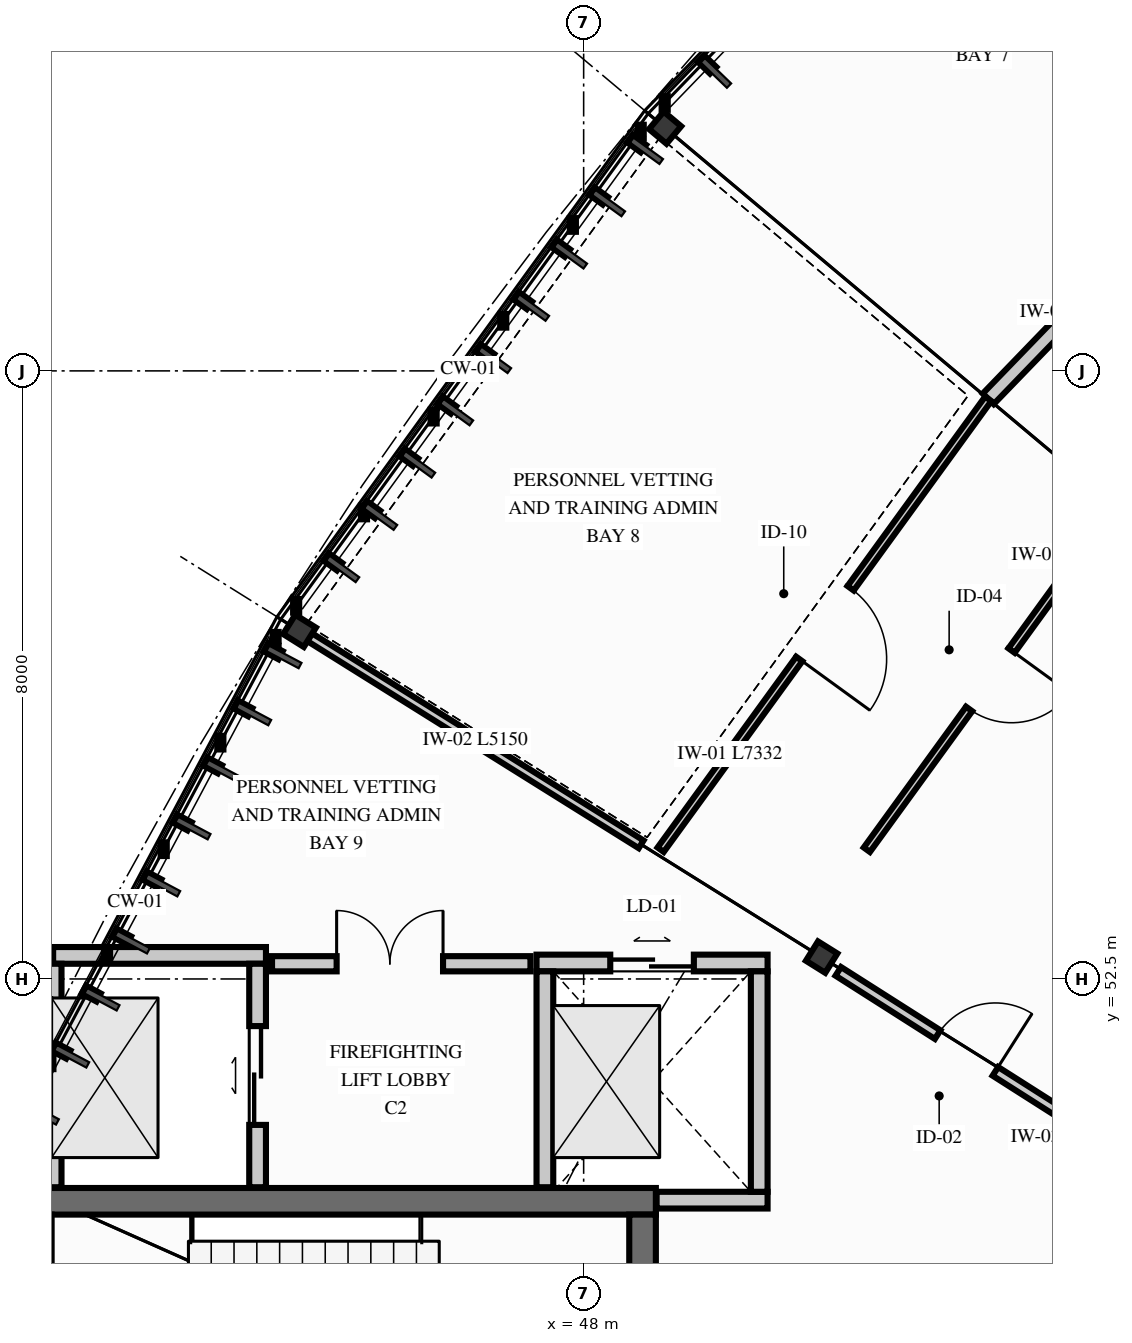
"""IFC4 building model, lengths in metres.
Left out: names, types, materials, properties, quantities, classifications, styles, units other than length and angle.
Written with IfcOpenShell. Run it as: python <this file> out.ifc"""

import sys

from ifc_helpers import new_model, si_unit, direction, frame, frame_2d, origin, origin_2d, place, context, subcontext, project, spatial, rectangle, i_section, extrude, element, fill, save


model = new_model("IFC4")
c1 = context("Model", 3, precision=1e-05, world=origin(), true_north=direction((0.0, 1.0)))
c2 = subcontext(c1, "Body", "Model", "MODEL_VIEW")
j1 = project(units=[si_unit("LENGTHUNIT", "METRE"), si_unit("PLANEANGLEUNIT", "RADIAN")], contexts=[c1])
p1 = place(None, origin())
s1 = spatial("IfcSite", under=j1, at=p1, CompositionType="ELEMENT")
p2 = place(p1, origin())
s2 = spatial("IfcBuilding", under=s1, at=p2, CompositionType="ELEMENT")
p3 = place(p2, frame((0.0, 0.0, 21.6)))
s3 = spatial("IfcBuildingStorey", under=s2, at=p3, CompositionType="ELEMENT", Elevation=21.6)
p4 = place(p3, frame((40.65, 49.575, 0.0), z_axis=(0.0, 0.0, 1.0), x_axis=(1.0, 0.0, 0.0)))
e1 = element("IfcWall", 1, at=p4, inside=s3, PredefinedType="SHEAR", context=c2, shape_type="SweptSolid", body=[
    extrude(rectangle(XDim=8.3, YDim=0.35, at=frame_2d((4.15, 0.0))), origin(), (0.0, 0.0, 1.0), 3.7),
])
p5 = place(p3, frame((48.775, 42.6, 0.0), z_axis=(0.0, 0.0, 1.0), x_axis=(0.0, 1.0, 0.0)))
e2 = element("IfcWall", 2, at=p5, inside=s3, PredefinedType="SHEAR", context=c2, shape_type="SweptSolid", body=[
    extrude(rectangle(XDim=6.8, YDim=0.35, at=frame_2d((3.4, 0.0))), origin(), (0.0, 0.0, 1.0), 3.7),
])
for number, where, z_axis, x_axis in (
    (3, (49.072, 63.699, 0.0), (0.0, 0.0, 1.0), (0.643, 0.766, 0.0)),
    (4, (51.131, 52.787, 0.0), (0.0, 0.0, 1.0), (0.53, 0.848, 0.0)),
):
    element("IfcColumn", number, at=place(p3, frame(where, z_axis=z_axis, x_axis=x_axis)), inside=s3, PredefinedType="COLUMN", context=c2, shape_type="SweptSolid", body=[
        extrude(i_section(OverallWidth=0.3, OverallDepth=0.3, WebThickness=0.011, FlangeThickness=0.019, FilletRadius=0.027, at=origin_2d()), origin(), (0.0, 0.0, 1.0), 3.9),
    ])
p6 = place(p3, frame((44.262, 57.08, 0.0), z_axis=(0.0, 0.0, 1.0), x_axis=(0.529919264233, 0.848048096156, 0.0)))
e5 = element("IfcColumn", 5, at=p6, inside=s3, PredefinedType="COLUMN", context=c2, shape_type="SweptSolid", body=[
    extrude(i_section(OverallWidth=0.3, OverallDepth=0.32, WebThickness=0.011, FlangeThickness=0.021, FilletRadius=0.027, at=origin_2d()), origin(), (0.0, 0.0, 1.0), 3.9),
])
p7 = place(p3, frame((41.02, 52.81, 0.0), z_axis=(0.0, 0.0, 1.0), x_axis=(1.0, 0.0, 0.0)))
e6 = element("IfcWall", 6, at=p7, inside=s3, PredefinedType="PARTITIONING", context=c2, shape_type="SweptSolid", body=[
    extrude(rectangle(XDim=2.8, YDim=0.22, at=frame_2d((1.4, 0.0))), origin(), (0.0, 0.0, 1.0), 3.62),
])
p8 = place(p3, frame((41.02, 49.76, 0.0), z_axis=(0.0, 0.0, 1.0), x_axis=(0.0, 1.0, 0.0)))
e7 = element("IfcWall", 7, at=p8, inside=s3, PredefinedType="PARTITIONING", context=c2, shape_type="SweptSolid", body=[
    extrude(rectangle(XDim=2.94, YDim=0.22, at=frame_2d((1.47, 0.0))), origin(), (0.0, 0.0, 1.0), 3.62),
])
p9 = place(p3, frame((43.71, 49.76, 0.0), z_axis=(0.0, 0.0, 1.0), x_axis=(0.0, 1.0, 0.0)))
e8 = element("IfcWall", 8, at=p9, inside=s3, PredefinedType="PARTITIONING", context=c2, shape_type="SweptSolid", body=[
    extrude(rectangle(XDim=2.94, YDim=0.22, at=frame_2d((1.47, 0.0))), origin(), (0.0, 0.0, 1.0), 3.62),
])
p10 = place(p9, frame((0.82, 0.0, 0.0)))
e9 = element("IfcOpeningElement", 9, at=p10, cuts=e8, PredefinedType="OPENING", context=c2, shape_type="SweptSolid", body=[
    extrude(rectangle(XDim=1.3, YDim=2.2, at=frame_2d((0.65, 1.1))), frame((0.0, 0.12, 0.0), z_axis=(0.0, -1.0, 0.0), x_axis=(1.0, 0.0, 0.0)), (0.0, 0.0, 1.0), 0.24),
])
p11 = place(p3, frame((48.96, 49.59, 0.0), z_axis=(0.0, 0.0, 1.0), x_axis=(1.0, 0.0, 0.0)))
e10 = element("IfcWall", 10, at=p11, inside=s3, PredefinedType="PARTITIONING", context=c2, shape_type="SweptSolid", body=[
    extrude(rectangle(XDim=1.46, YDim=0.22, at=frame_2d((0.73, 0.0))), origin(), (0.0, 0.0, 1.0), 3.62),
])
p12 = place(p3, frame((47.38, 52.71, 0.0), z_axis=(0.0, 0.0, 1.0), x_axis=(1.0, 0.0, 0.0)))
e11 = element("IfcWall", 11, at=p12, inside=s3, PredefinedType="PARTITIONING", context=c2, shape_type="SweptSolid", body=[
    extrude(rectangle(XDim=3.04, YDim=0.22, at=frame_2d((1.52, 0.0))), origin(), (0.0, 0.0, 1.0), 3.62),
])
p13 = place(p12, frame((0.97, 0.0, 0.0)))
e12 = element("IfcOpeningElement", 12, at=p13, cuts=e11, PredefinedType="OPENING", context=c2, shape_type="SweptSolid", body=[
    extrude(rectangle(XDim=1.1, YDim=2.15, at=frame_2d((0.55, 1.075))), frame((0.0, 0.12, 0.0), z_axis=(0.0, -1.0, 0.0), x_axis=(1.0, 0.0, 0.0)), (0.0, 0.0, 1.0), 0.24),
])
p14 = place(p3, frame((47.49, 49.76, 0.0), z_axis=(0.0, 0.0, 1.0), x_axis=(0.0, 1.0, 0.0)))
e13 = element("IfcWall", 13, at=p14, inside=s3, PredefinedType="PARTITIONING", context=c2, shape_type="SweptSolid", body=[
    extrude(rectangle(XDim=2.84, YDim=0.22, at=frame_2d((1.42, 0.0))), origin(), (0.0, 0.0, 1.0), 3.62),
])
p15 = place(p3, frame((50.31, 49.7, 0.0), z_axis=(0.0, 0.0, 1.0), x_axis=(0.0, 1.0, 0.0)))
e14 = element("IfcWall", 14, at=p15, inside=s3, PredefinedType="PARTITIONING", context=c2, shape_type="SweptSolid", body=[
    extrude(rectangle(XDim=2.9, YDim=0.22, at=frame_2d((1.45, 0.0))), origin(), (0.0, 0.0, 1.0), 3.62),
])
p16 = place(p3, frame((43.9, 52.7, 0.0), z_axis=(0.0, 0.0, 1.0), x_axis=(1.0, 0.0, 0.0)))
e15 = element("IfcWall", 15, at=p16, inside=s3, PredefinedType="PARTITIONING", context=c2, shape_type="SweptSolid", body=[
    extrude(rectangle(XDim=3.4, YDim=0.2, at=frame_2d((1.7, 0.0))), origin(), (0.0, 0.0, 1.0), 3.62),
])
p17 = place(p16, frame((0.85, 0.0, 0.0)))
e16 = element("IfcOpeningElement", 16, at=p17, cuts=e15, PredefinedType="OPENING", context=c2, shape_type="SweptSolid", body=[
    extrude(rectangle(XDim=1.4, YDim=2.25, at=frame_2d((0.7, 1.125))), frame((0.0, 0.11, 0.0), z_axis=(0.0, -1.0, 0.0), x_axis=(1.0, 0.0, 0.0)), (0.0, 0.0, 1.0), 0.22),
])
p18 = place(p3, frame((51.35, 52.6, 0.0), z_axis=(0.0, 0.0, 1.0), x_axis=(0.84363284859, -0.536920493909, 0.0)))
e17 = element("IfcWall", 17, at=p18, inside=s3, PredefinedType="PARTITIONING", context=c2, shape_type="SweptSolid", body=[
    extrude(rectangle(XDim=4.563, YDim=0.135, at=frame_2d((2.282, 0.0))), origin(), (0.0, 0.0, 1.0), 3.3),
])
p19 = place(p18, frame((1.55, 0.0, 0.0)))
e18 = element("IfcOpeningElement", 18, at=p19, cuts=e17, PredefinedType="OPENING", context=c2, shape_type="SweptSolid", body=[
    extrude(rectangle(XDim=0.9, YDim=2.1, at=frame_2d((0.45, 1.05))), frame((0.0, 0.077, 0.0), z_axis=(0.0, -1.0, 0.0), x_axis=(1.0, 0.0, 0.0)), (0.0, 0.0, 1.0), 0.155),
])
p20 = place(p3, frame((58.469, 65.461, 0.0), z_axis=(0.0, 0.0, 1.0), x_axis=(-0.694673907436, -0.71932479613, 0.0)))
e19 = element("IfcWall", 19, at=p20, inside=s3, PredefinedType="PARTITIONING", context=c2, shape_type="SweptSolid", body=[
    extrude(rectangle(XDim=7.408, YDim=0.2, at=frame_2d((3.704, 0.0))), origin(), (0.0, 0.0, 1.0), 3.62),
])
p21 = place(p20, frame((3.111, 0.0, 0.0)))
e20 = element("IfcOpeningElement", 20, at=p21, cuts=e19, PredefinedType="OPENING", context=c2, shape_type="SweptSolid", body=[
    extrude(rectangle(XDim=1.12, YDim=2.2, at=frame_2d((0.56, 1.1))), frame((0.0, 0.11, 0.0), z_axis=(0.0, -1.0, 0.0), x_axis=(1.0, 0.0, 0.0)), (0.0, 0.0, 1.0), 0.22),
])
p22 = place(p3, frame((55.008, 58.718, 0.0), z_axis=(0.0, 0.0, 1.0), x_axis=(-0.587773920785, -0.809025227076, 0.0)))
e21 = element("IfcWall", 21, at=p22, inside=s3, PredefinedType="PARTITIONING", context=c2, shape_type="SweptSolid", body=[
    extrude(rectangle(XDim=5.584, YDim=0.1, at=frame_2d((2.792, 0.0))), origin(), (0.0, 0.0, 1.0), 3.62),
])
p23 = place(p22, frame((2.345, 0.0, 0.0)))
e22 = element("IfcOpeningElement", 22, at=p23, cuts=e21, PredefinedType="OPENING", context=c2, shape_type="SweptSolid", body=[
    extrude(rectangle(XDim=0.95, YDim=2.15, at=frame_2d((0.475, 1.075))), frame((0.0, 0.06, 0.0), z_axis=(0.0, -1.0, 0.0), x_axis=(1.0, 0.0, 0.0)), (0.0, 0.0, 1.0), 0.12),
])
p24 = place(p3, frame((53.323, 60.132, 0.0), z_axis=(0.0, 0.0, 1.0), x_axis=(-0.587773694682, -0.809025391344, 0.0)))
e23 = element("IfcWall", 23, at=p24, inside=s3, PredefinedType="PARTITIONING", context=c2, shape_type="SweptSolid", body=[
    extrude(rectangle(XDim=7.333, YDim=0.1, at=frame_2d((3.666, 0.0))), origin(), (0.0, 0.0, 1.0), 3.62),
])
p25 = place(p24, frame((3.08, 0.0, 0.0)))
e24 = element("IfcOpeningElement", 24, at=p25, cuts=e23, PredefinedType="OPENING", context=c2, shape_type="SweptSolid", body=[
    extrude(rectangle(XDim=1.15, YDim=2.2, at=frame_2d((0.575, 1.1))), frame((0.0, 0.06, 0.0), z_axis=(0.0, -1.0, 0.0), x_axis=(1.0, 0.0, 0.0)), (0.0, 0.0, 1.0), 0.12),
])
p26 = place(p3, frame((48.757, 54.271, 0.0), z_axis=(0.0, 0.0, 1.0), x_axis=(-0.848054228257, 0.529909450694, 0.0)))
e25 = element("IfcWall", 25, at=p26, inside=s3, PredefinedType="PARTITIONING", context=c2, shape_type="SweptSolid", body=[
    extrude(rectangle(XDim=5.15, YDim=0.12, at=frame_2d((2.575, 0.0))), origin(), (0.0, 0.0, 1.0), 3.25),
])
p27 = place(p10, origin())
e26 = element("IfcDoor", 26, at=p27, inside=s3, OperationType="DOUBLE_DOOR_SLIDING", PredefinedType="DOOR", context=c2, shape_type="SweptSolid", body=[
    extrude(rectangle(XDim=1.3, YDim=2.2, at=frame_2d((0.65, 1.1))), frame((0.0, 0.025, 0.0), z_axis=(0.0, -1.0, 0.0), x_axis=(1.0, 0.0, 0.0)), (0.0, 0.0, 1.0), 0.05),
])
fill(e9, e26)
p28 = place(p13, origin())
e27 = element("IfcDoor", 27, at=p28, inside=s3, OperationType="DOUBLE_DOOR_SLIDING", PredefinedType="DOOR", context=c2, shape_type="SweptSolid", body=[
    extrude(rectangle(XDim=1.1, YDim=2.15, at=frame_2d((0.55, 1.075))), frame((0.0, 0.025, 0.0), z_axis=(0.0, -1.0, 0.0), x_axis=(1.0, 0.0, 0.0)), (0.0, 0.0, 1.0), 0.05),
])
fill(e12, e27)
p29 = place(p17, origin())
e28 = element("IfcDoor", 28, at=p29, inside=s3, OperationType="DOUBLE_DOOR_SINGLE_SWING", PredefinedType="DOOR", context=c2, shape_type="SweptSolid", body=[
    extrude(rectangle(XDim=1.4, YDim=2.25, at=frame_2d((0.7, 1.125))), frame((0.0, 0.025, 0.0), z_axis=(0.0, -1.0, 0.0), x_axis=(1.0, 0.0, 0.0)), (0.0, 0.0, 1.0), 0.05),
])
fill(e16, e28)
p30 = place(p19, origin())
e29 = element("IfcDoor", 29, at=p30, inside=s3, OperationType="SINGLE_SWING_RIGHT", PredefinedType="DOOR", context=c2, shape_type="SweptSolid", body=[
    extrude(rectangle(XDim=0.9, YDim=2.1, at=frame_2d((0.45, 1.05))), frame((0.0, 0.025, 0.0), z_axis=(0.0, -1.0, 0.0), x_axis=(1.0, 0.0, 0.0)), (0.0, 0.0, 1.0), 0.05),
])
fill(e18, e29)
p31 = place(p23, origin())
e30 = element("IfcDoor", 30, at=p31, inside=s3, OperationType="SINGLE_SWING_LEFT", PredefinedType="DOOR", context=c2, shape_type="SweptSolid", body=[
    extrude(rectangle(XDim=0.95, YDim=2.15, at=frame_2d((0.475, 1.075))), frame((0.0, 0.025, 0.0), z_axis=(0.0, -1.0, 0.0), x_axis=(1.0, 0.0, 0.0)), (0.0, 0.0, 1.0), 0.05),
])
fill(e22, e30)
p32 = place(p25, origin())
e31 = element("IfcDoor", 31, at=p32, inside=s3, OperationType="SINGLE_SWING_RIGHT", PredefinedType="DOOR", context=c2, shape_type="SweptSolid", body=[
    extrude(rectangle(XDim=1.15, YDim=2.2, at=frame_2d((0.575, 1.1))), frame((0.0, 0.025, 0.0), z_axis=(0.0, -1.0, 0.0), x_axis=(1.0, 0.0, 0.0)), (0.0, 0.0, 1.0), 0.05),
])
fill(e24, e31)
save(model, sys.argv[1])
